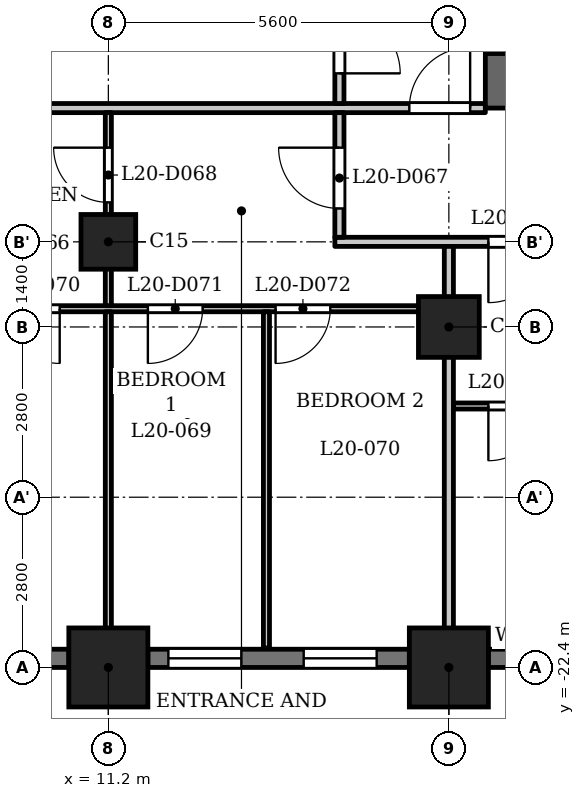
"""IFC4 building model, lengths in metres.
Left out: names, types, materials, properties, quantities, classifications, styles, units other than length and angle.
Written with IfcOpenShell. Run it as: python <this file> out.ifc"""

import sys

from ifc_helpers import new_model, si_unit, direction, frame, frame_2d, origin, origin_2d, place, context, subcontext, project, spatial, rectangle, extrude, element, fill, save


model = new_model("IFC4")
c1 = context("Model", 3, precision=1e-05, world=origin(), true_north=direction((0.0, 1.0)))
c2 = subcontext(c1, "Body", "Model", "MODEL_VIEW")
j1 = project(units=[si_unit("LENGTHUNIT", "METRE"), si_unit("PLANEANGLEUNIT", "RADIAN")], contexts=[c1])
p1 = place(None, origin())
s1 = spatial("IfcSite", under=j1, at=p1, CompositionType="ELEMENT")
p2 = place(p1, origin())
s2 = spatial("IfcBuilding", under=s1, at=p2, CompositionType="ELEMENT")
p3 = place(p2, frame((0.0, 0.0, 83.3)))
s3 = spatial("IfcBuildingStorey", under=s2, at=p3, CompositionType="ELEMENT", Elevation=83.3)
for number, where, z_axis, x_axis in (
    (1, (11.2, -22.4, 0.0), (0.0, 0.0, 1.0), (1.0, 0.0, 0.0)),
    (2, (16.8, -22.4, 0.0), (0.0, 0.0, 1.0), (1.0, 0.0, 0.0)),
):
    element("IfcColumn", number, at=place(p3, frame(where, z_axis=z_axis, x_axis=x_axis)), inside=s3, PredefinedType="COLUMN", context=c2, shape_type="SweptSolid", body=[
        extrude(rectangle(XDim=1.3, YDim=1.3, at=origin_2d()), origin(), (0.0, 0.0, 1.0), 3.5),
    ])
p4 = place(p3, frame((16.8, -16.8, 0.0), z_axis=(0.0, 0.0, 1.0), x_axis=(1.0, 0.0, 0.0)))
e3 = element("IfcColumn", 3, at=p4, inside=s3, PredefinedType="COLUMN", context=c2, shape_type="SweptSolid", body=[
    extrude(rectangle(XDim=1.0, YDim=1.0, at=origin_2d()), origin(), (0.0, 0.0, 1.0), 3.5),
])
p5 = place(p3, frame((11.2, -15.4, 0.0), z_axis=(0.0, 0.0, 1.0), x_axis=(1.0, 0.0, 0.0)))
e4 = element("IfcColumn", 4, at=p5, inside=s3, PredefinedType="COLUMN", context=c2, shape_type="SweptSolid", body=[
    extrude(rectangle(XDim=0.9, YDim=0.9, at=origin_2d()), origin(), (0.0, 0.0, 1.0), 3.5),
])
p6 = place(p3, frame((6.25, -22.25, 0.0), z_axis=(0.0, 0.0, 1.0), x_axis=(1.0, 0.0, 0.0)))
e5 = element("IfcWall", 5, at=p6, inside=s3, PredefinedType="SOLIDWALL", context=c2, shape_type="SweptSolid", body=[
    extrude(rectangle(XDim=4.3, YDim=0.3, at=frame_2d((2.15, 0.0))), origin(), (0.0, 0.0, 1.0), 2.4),
])
p7 = place(p6, frame((0.35, 0.0, 1.2)))
e6 = element("IfcOpeningElement", 6, at=p7, cuts=e5, PredefinedType="OPENING", context=c2, shape_type="SweptSolid", body=[
    extrude(rectangle(XDim=3.6, YDim=0.95, at=frame_2d((1.8, 0.475))), frame((0.0, 0.16, 0.0), z_axis=(0.0, -1.0, 0.0), x_axis=(1.0, 0.0, 0.0)), (0.0, 0.0, 1.0), 0.32),
])
p8 = place(p3, frame((11.85, -22.25, 0.0), z_axis=(0.0, 0.0, 1.0), x_axis=(1.0, 0.0, 0.0)))
e7 = element("IfcWall", 7, at=p8, inside=s3, PredefinedType="SOLIDWALL", context=c2, shape_type="SweptSolid", body=[
    extrude(rectangle(XDim=4.3, YDim=0.3, at=frame_2d((2.15, 0.0))), origin(), (0.0, 0.0, 1.0), 2.4),
])
p9 = place(p8, frame((0.337, 0.0, 0.6)))
e8 = element("IfcOpeningElement", 8, at=p9, cuts=e7, PredefinedType="OPENING", context=c2, shape_type="SweptSolid", body=[
    extrude(rectangle(XDim=1.2, YDim=1.55, at=frame_2d((0.6, 0.775))), frame((0.0, 0.16, 0.0), z_axis=(0.0, -1.0, 0.0), x_axis=(1.0, 0.0, 0.0)), (0.0, 0.0, 1.0), 0.32),
])
p10 = place(p8, frame((2.562, 0.0, 0.6)))
e9 = element("IfcOpeningElement", 9, at=p10, cuts=e7, PredefinedType="OPENING", context=c2, shape_type="SweptSolid", body=[
    extrude(rectangle(XDim=1.2, YDim=1.55, at=frame_2d((0.6, 0.775))), frame((0.0, 0.16, 0.0), z_axis=(0.0, -1.0, 0.0), x_axis=(1.0, 0.0, 0.0)), (0.0, 0.0, 1.0), 0.32),
])
p11 = place(p3, frame((17.45, -22.25, 0.0), z_axis=(0.0, 0.0, 1.0), x_axis=(1.0, 0.0, 0.0)))
e10 = element("IfcWall", 10, at=p11, inside=s3, PredefinedType="SOLIDWALL", context=c2, shape_type="SweptSolid", body=[
    extrude(rectangle(XDim=2.55, YDim=0.3, at=frame_2d((1.275, 0.0))), origin(), (0.0, 0.0, 1.0), 2.4),
])
p12 = place(p11, frame((0.375, 0.0, 0.9)))
e11 = element("IfcOpeningElement", 11, at=p12, cuts=e10, PredefinedType="OPENING", context=c2, shape_type="SweptSolid", body=[
    extrude(rectangle(XDim=1.8, YDim=1.25, at=frame_2d((0.9, 0.625))), frame((0.0, 0.16, 0.0), z_axis=(0.0, -1.0, 0.0), x_axis=(1.0, 0.0, 0.0)), (0.0, 0.0, 1.0), 0.32),
])
p13 = place(p3, frame((17.4, -12.75, 0.0), z_axis=(0.0, 0.0, 1.0), x_axis=(1.0, 0.0, 0.0)))
e12 = element("IfcWall", 12, at=p13, inside=s3, PredefinedType="SHEAR", context=c2, shape_type="SweptSolid", body=[
    extrude(rectangle(XDim=10.4, YDim=0.9, at=frame_2d((5.2, 0.0))), origin(), (0.0, 0.0, 1.0), 3.2),
])
p14 = place(p3, frame((17.6, -12.3, 0.0), z_axis=(0.0, 0.0, 1.0), x_axis=(0.0, 1.0, 0.0)))
e13 = element("IfcWall", 13, at=p14, inside=s3, PredefinedType="SHEAR", context=c2, shape_type="SweptSolid", body=[
    extrude(rectangle(XDim=24.6, YDim=0.4, at=frame_2d((12.3, 0.0))), origin(), (0.0, 0.0, 1.0), 3.2),
])
p15 = place(p14, frame((6.0, 0.0, 0.0)))
e14 = element("IfcOpeningElement", 14, at=p15, cuts=e13, PredefinedType="OPENING", context=c2, shape_type="SweptSolid", body=[
    extrude(rectangle(XDim=1.1, YDim=2.1, at=frame_2d((0.55, 1.05))), frame((0.0, 0.21, 0.0), z_axis=(0.0, -1.0, 0.0), x_axis=(1.0, 0.0, 0.0)), (0.0, 0.0, 1.0), 0.42),
])
p16 = place(p14, frame((8.4, 0.0, 0.0)))
e15 = element("IfcOpeningElement", 15, at=p16, cuts=e13, PredefinedType="OPENING", context=c2, shape_type="SweptSolid", body=[
    extrude(rectangle(XDim=1.1, YDim=2.1, at=frame_2d((0.55, 1.05))), frame((0.0, 0.21, 0.0), z_axis=(0.0, -1.0, 0.0), x_axis=(1.0, 0.0, 0.0)), (0.0, 0.0, 1.0), 0.42),
])
p17 = place(p14, frame((10.8, 0.0, 0.0)))
e16 = element("IfcOpeningElement", 16, at=p17, cuts=e13, PredefinedType="OPENING", context=c2, shape_type="SweptSolid", body=[
    extrude(rectangle(XDim=1.1, YDim=2.1, at=frame_2d((0.55, 1.05))), frame((0.0, 0.21, 0.0), z_axis=(0.0, -1.0, 0.0), x_axis=(1.0, 0.0, 0.0)), (0.0, 0.0, 1.0), 0.42),
])
p18 = place(p14, frame((16.75, 0.0, 0.0)))
e17 = element("IfcOpeningElement", 17, at=p18, cuts=e13, PredefinedType="OPENING", context=c2, shape_type="SweptSolid", body=[
    extrude(rectangle(XDim=0.9, YDim=2.1, at=frame_2d((0.45, 1.05))), frame((0.0, 0.21, 0.0), z_axis=(0.0, -1.0, 0.0), x_axis=(1.0, 0.0, 0.0)), (0.0, 0.0, 1.0), 0.42),
])
p19 = place(p14, frame((22.8, 0.0, 0.0)))
e18 = element("IfcOpeningElement", 18, at=p19, cuts=e13, PredefinedType="OPENING", context=c2, shape_type="SweptSolid", body=[
    extrude(rectangle(XDim=1.1, YDim=2.1, at=frame_2d((0.55, 1.05))), frame((0.0, 0.21, 0.0), z_axis=(0.0, -1.0, 0.0), x_axis=(1.0, 0.0, 0.0)), (0.0, 0.0, 1.0), 0.42),
])
p20 = place(p14, frame((0.7, 0.0, 0.0)))
e19 = element("IfcOpeningElement", 19, at=p20, cuts=e13, PredefinedType="OPENING", context=c2, shape_type="SweptSolid", body=[
    extrude(rectangle(XDim=1.1, YDim=2.1, at=frame_2d((0.55, 1.05))), frame((0.0, 0.21, 0.0), z_axis=(0.0, -1.0, 0.0), x_axis=(1.0, 0.0, 0.0)), (0.0, 0.0, 1.0), 0.42),
])
p21 = place(p14, frame((12.775, 0.0, 0.0)))
e20 = element("IfcOpeningElement", 20, at=p21, cuts=e13, PredefinedType="OPENING", context=c2, shape_type="SweptSolid", body=[
    extrude(rectangle(XDim=1.8, YDim=2.1, at=frame_2d((0.9, 1.05))), frame((0.0, 0.21, 0.0), z_axis=(0.0, -1.0, 0.0), x_axis=(1.0, 0.0, 0.0)), (0.0, 0.0, 1.0), 0.42),
])
p22 = place(p3, frame((16.875, -18.1, 0.0), z_axis=(0.0, 0.0, 1.0), x_axis=(1.0, 0.0, 0.0)))
e21 = element("IfcWall", 21, at=p22, inside=s3, PredefinedType="PARTITIONING", context=c2, shape_type="SweptSolid", body=[
    extrude(rectangle(XDim=9.565, YDim=0.1, at=frame_2d((4.782, 0.0))), origin(), (0.0, 0.0, 1.0), 3.2),
])
p23 = place(p22, frame((6.139, 0.0, 0.0)))
e22 = element("IfcOpeningElement", 22, at=p23, cuts=e21, PredefinedType="OPENING", context=c2, shape_type="SweptSolid", body=[
    extrude(rectangle(XDim=0.8, YDim=2.1, at=frame_2d((0.4, 1.05))), frame((0.0, 0.06, 0.0), z_axis=(0.0, -1.0, 0.0), x_axis=(1.0, 0.0, 0.0)), (0.0, 0.0, 1.0), 0.12),
])
p24 = place(p22, frame((0.575, 0.0, 0.0)))
e23 = element("IfcOpeningElement", 23, at=p24, cuts=e21, PredefinedType="OPENING", context=c2, shape_type="SweptSolid", body=[
    extrude(rectangle(XDim=0.9, YDim=2.1, at=frame_2d((0.45, 1.05))), frame((0.0, 0.06, 0.0), z_axis=(0.0, -1.0, 0.0), x_axis=(1.0, 0.0, 0.0)), (0.0, 0.0, 1.0), 0.12),
])
p25 = place(p3, frame((-16.725, -16.5, 0.0), z_axis=(0.0, 0.0, 1.0), x_axis=(1.0, 0.0, 0.0)))
e24 = element("IfcWall", 24, at=p25, inside=s3, PredefinedType="PARTITIONING", context=c2, shape_type="SweptSolid", body=[
    extrude(rectangle(XDim=33.45, YDim=0.1, at=frame_2d((16.725, 0.0))), origin(), (0.0, 0.0, 1.0), 3.2),
])
p26 = place(p25, frame((3.825, 0.0, 0.0)))
e25 = element("IfcOpeningElement", 25, at=p26, cuts=e24, PredefinedType="OPENING", context=c2, shape_type="SweptSolid", body=[
    extrude(rectangle(XDim=0.8, YDim=2.1, at=frame_2d((0.4, 1.05))), frame((0.0, 0.06, 0.0), z_axis=(0.0, -1.0, 0.0), x_axis=(1.0, 0.0, 0.0)), (0.0, 0.0, 1.0), 0.12),
])
p27 = place(p25, frame((1.825, 0.0, 0.0)))
e26 = element("IfcOpeningElement", 26, at=p27, cuts=e24, PredefinedType="OPENING", context=c2, shape_type="SweptSolid", body=[
    extrude(rectangle(XDim=0.9, YDim=2.1, at=frame_2d((0.45, 1.05))), frame((0.0, 0.06, 0.0), z_axis=(0.0, -1.0, 0.0), x_axis=(1.0, 0.0, 0.0)), (0.0, 0.0, 1.0), 0.12),
])
p28 = place(p25, frame((9.675, 0.0, 0.0)))
e27 = element("IfcOpeningElement", 27, at=p28, cuts=e24, PredefinedType="OPENING", context=c2, shape_type="SweptSolid", body=[
    extrude(rectangle(XDim=0.8, YDim=2.1, at=frame_2d((0.4, 1.05))), frame((0.0, 0.06, 0.0), z_axis=(0.0, -1.0, 0.0), x_axis=(1.0, 0.0, 0.0)), (0.0, 0.0, 1.0), 0.12),
])
p29 = place(p25, frame((6.425, 0.0, 0.0)))
e28 = element("IfcOpeningElement", 28, at=p29, cuts=e24, PredefinedType="OPENING", context=c2, shape_type="SweptSolid", body=[
    extrude(rectangle(XDim=0.9, YDim=2.1, at=frame_2d((0.45, 1.05))), frame((0.0, 0.06, 0.0), z_axis=(0.0, -1.0, 0.0), x_axis=(1.0, 0.0, 0.0)), (0.0, 0.0, 1.0), 0.12),
])
p30 = place(p25, frame((15.275, 0.0, 0.0)))
e29 = element("IfcOpeningElement", 29, at=p30, cuts=e24, PredefinedType="OPENING", context=c2, shape_type="SweptSolid", body=[
    extrude(rectangle(XDim=0.8, YDim=2.1, at=frame_2d((0.4, 1.05))), frame((0.0, 0.06, 0.0), z_axis=(0.0, -1.0, 0.0), x_axis=(1.0, 0.0, 0.0)), (0.0, 0.0, 1.0), 0.12),
])
p31 = place(p25, frame((12.025, 0.0, 0.0)))
e30 = element("IfcOpeningElement", 30, at=p31, cuts=e24, PredefinedType="OPENING", context=c2, shape_type="SweptSolid", body=[
    extrude(rectangle(XDim=0.9, YDim=2.1, at=frame_2d((0.45, 1.05))), frame((0.0, 0.06, 0.0), z_axis=(0.0, -1.0, 0.0), x_axis=(1.0, 0.0, 0.0)), (0.0, 0.0, 1.0), 0.12),
])
p32 = place(p25, frame((20.875, 0.0, 0.0)))
e31 = element("IfcOpeningElement", 31, at=p32, cuts=e24, PredefinedType="OPENING", context=c2, shape_type="SweptSolid", body=[
    extrude(rectangle(XDim=0.8, YDim=2.1, at=frame_2d((0.4, 1.05))), frame((0.0, 0.06, 0.0), z_axis=(0.0, -1.0, 0.0), x_axis=(1.0, 0.0, 0.0)), (0.0, 0.0, 1.0), 0.12),
])
p33 = place(p25, frame((18.625, 0.0, 0.0)))
e32 = element("IfcOpeningElement", 32, at=p33, cuts=e24, PredefinedType="OPENING", context=c2, shape_type="SweptSolid", body=[
    extrude(rectangle(XDim=0.9, YDim=2.1, at=frame_2d((0.45, 1.05))), frame((0.0, 0.06, 0.0), z_axis=(0.0, -1.0, 0.0), x_axis=(1.0, 0.0, 0.0)), (0.0, 0.0, 1.0), 0.12),
])
p34 = place(p25, frame((23.875, 0.0, 0.0)))
e33 = element("IfcOpeningElement", 33, at=p34, cuts=e24, PredefinedType="OPENING", context=c2, shape_type="SweptSolid", body=[
    extrude(rectangle(XDim=0.8, YDim=2.1, at=frame_2d((0.4, 1.05))), frame((0.0, 0.06, 0.0), z_axis=(0.0, -1.0, 0.0), x_axis=(1.0, 0.0, 0.0)), (0.0, 0.0, 1.0), 0.12),
])
p35 = place(p25, frame((26.225, 0.0, 0.0)))
e34 = element("IfcOpeningElement", 34, at=p35, cuts=e24, PredefinedType="OPENING", context=c2, shape_type="SweptSolid", body=[
    extrude(rectangle(XDim=0.9, YDim=2.1, at=frame_2d((0.45, 1.05))), frame((0.0, 0.06, 0.0), z_axis=(0.0, -1.0, 0.0), x_axis=(1.0, 0.0, 0.0)), (0.0, 0.0, 1.0), 0.12),
])
p36 = place(p25, frame((28.575, 0.0, 0.0)))
e35 = element("IfcOpeningElement", 35, at=p36, cuts=e24, PredefinedType="OPENING", context=c2, shape_type="SweptSolid", body=[
    extrude(rectangle(XDim=0.9, YDim=2.1, at=frame_2d((0.45, 1.05))), frame((0.0, 0.06, 0.0), z_axis=(0.0, -1.0, 0.0), x_axis=(1.0, 0.0, 0.0)), (0.0, 0.0, 1.0), 0.12),
])
p37 = place(p25, frame((30.675, 0.0, 0.0)))
e36 = element("IfcOpeningElement", 36, at=p37, cuts=e24, PredefinedType="OPENING", context=c2, shape_type="SweptSolid", body=[
    extrude(rectangle(XDim=0.9, YDim=2.1, at=frame_2d((0.45, 1.05))), frame((0.0, 0.06, 0.0), z_axis=(0.0, -1.0, 0.0), x_axis=(1.0, 0.0, 0.0)), (0.0, 0.0, 1.0), 0.12),
])
p38 = place(p3, frame((14.925, -15.4, 0.0), z_axis=(0.0, 0.0, 1.0), x_axis=(1.0, 0.0, 0.0)))
e37 = element("IfcWall", 37, at=p38, inside=s3, PredefinedType="PARTITIONING", context=c2, shape_type="SweptSolid", body=[
    extrude(rectangle(XDim=12.559, YDim=0.15, at=frame_2d((6.279, 0.0))), origin(), (0.0, 0.0, 1.0), 3.2),
])
p39 = place(p38, frame((2.525, 0.0, 0.0)))
e38 = element("IfcOpeningElement", 38, at=p39, cuts=e37, PredefinedType="OPENING", context=c2, shape_type="SweptSolid", body=[
    extrude(rectangle(XDim=1.0, YDim=2.1, at=frame_2d((0.5, 1.05))), frame((0.0, 0.085, 0.0), z_axis=(0.0, -1.0, 0.0), x_axis=(1.0, 0.0, 0.0)), (0.0, 0.0, 1.0), 0.17),
])
p40 = place(p3, frame((-17.4, -13.2, 0.0), z_axis=(0.0, 0.0, 1.0), x_axis=(1.0, 0.0, 0.0)))
e39 = element("IfcWall", 39, at=p40, inside=s3, PredefinedType="PARTITIONING", context=c2, shape_type="SweptSolid", body=[
    extrude(rectangle(XDim=34.8, YDim=0.15, at=frame_2d((17.4, 0.0))), origin(), (0.0, 0.0, 1.0), 3.2),
])
p41 = place(p40, frame((0.15, 0.0, 0.0)))
e40 = element("IfcOpeningElement", 40, at=p41, cuts=e39, PredefinedType="OPENING", context=c2, shape_type="SweptSolid", body=[
    extrude(rectangle(XDim=1.0, YDim=2.1, at=frame_2d((0.5, 1.05))), frame((0.0, 0.085, 0.0), z_axis=(0.0, -1.0, 0.0), x_axis=(1.0, 0.0, 0.0)), (0.0, 0.0, 1.0), 0.17),
])
p42 = place(p40, frame((33.55, 0.0, 0.0)))
e41 = element("IfcOpeningElement", 41, at=p42, cuts=e39, PredefinedType="OPENING", context=c2, shape_type="SweptSolid", body=[
    extrude(rectangle(XDim=1.0, YDim=2.1, at=frame_2d((0.5, 1.05))), frame((0.0, 0.085, 0.0), z_axis=(0.0, -1.0, 0.0), x_axis=(1.0, 0.0, 0.0)), (0.0, 0.0, 1.0), 0.17),
])
p43 = place(p40, frame((7.35, 0.0, 0.0)))
e42 = element("IfcOpeningElement", 42, at=p43, cuts=e39, PredefinedType="OPENING", context=c2, shape_type="SweptSolid", body=[
    extrude(rectangle(XDim=1.0, YDim=2.1, at=frame_2d((0.5, 1.05))), frame((0.0, 0.085, 0.0), z_axis=(0.0, -1.0, 0.0), x_axis=(1.0, 0.0, 0.0)), (0.0, 0.0, 1.0), 0.17),
])
p44 = place(p40, frame((13.7, 0.0, 0.0)))
e43 = element("IfcOpeningElement", 43, at=p44, cuts=e39, PredefinedType="OPENING", context=c2, shape_type="SweptSolid", body=[
    extrude(rectangle(XDim=1.0, YDim=2.1, at=frame_2d((0.5, 1.05))), frame((0.0, 0.085, 0.0), z_axis=(0.0, -1.0, 0.0), x_axis=(1.0, 0.0, 0.0)), (0.0, 0.0, 1.0), 0.17),
])
p45 = place(p40, frame((19.3, 0.0, 0.0)))
e44 = element("IfcOpeningElement", 44, at=p45, cuts=e39, PredefinedType="OPENING", context=c2, shape_type="SweptSolid", body=[
    extrude(rectangle(XDim=1.0, YDim=2.1, at=frame_2d((0.5, 1.05))), frame((0.0, 0.085, 0.0), z_axis=(0.0, -1.0, 0.0), x_axis=(1.0, 0.0, 0.0)), (0.0, 0.0, 1.0), 0.17),
])
p46 = place(p3, frame((11.2, -23.03, 0.0), z_axis=(0.0, 0.0, 1.0), x_axis=(0.0, 1.0, 0.0)))
e45 = element("IfcWall", 45, at=p46, inside=s3, PredefinedType="PARTITIONING", context=c2, shape_type="SweptSolid", body=[
    extrude(rectangle(XDim=6.48, YDim=0.1, at=frame_2d((3.24, 0.0))), origin(), (0.0, 0.0, 1.0), 3.2),
])
p47 = place(p3, frame((11.2, -16.45, 0.0), z_axis=(0.0, 0.0, 1.0), x_axis=(0.0, 1.0, 0.0)))
e46 = element("IfcWall", 46, at=p47, inside=s3, PredefinedType="PARTITIONING", context=c2, shape_type="SweptSolid", body=[
    extrude(rectangle(XDim=3.175, YDim=0.1, at=frame_2d((1.587, 0.0))), origin(), (0.0, 0.0, 1.0), 3.2),
])
p48 = place(p47, frame((1.699, 0.0, 0.0)))
e47 = element("IfcOpeningElement", 47, at=p48, cuts=e46, PredefinedType="OPENING", context=c2, shape_type="SweptSolid", body=[
    extrude(rectangle(XDim=0.9, YDim=2.1, at=frame_2d((0.45, 1.05))), frame((0.0, 0.06, 0.0), z_axis=(0.0, -1.0, 0.0), x_axis=(1.0, 0.0, 0.0)), (0.0, 0.0, 1.0), 0.12),
])
p49 = place(p3, frame((13.8, -22.08, 0.0), z_axis=(0.0, 0.0, 1.0), x_axis=(0.0, 1.0, 0.0)))
e48 = element("IfcWall", 48, at=p49, inside=s3, PredefinedType="PARTITIONING", context=c2, shape_type="SweptSolid", body=[
    extrude(rectangle(XDim=5.53, YDim=0.1, at=frame_2d((2.765, 0.0))), origin(), (0.0, 0.0, 1.0), 3.2),
])
p50 = place(p3, frame((15.0, -15.325, 0.0), z_axis=(0.0, 0.0, 1.0), x_axis=(0.0, 1.0, 0.0)))
e49 = element("IfcWall", 49, at=p50, inside=s3, PredefinedType="PARTITIONING", context=c2, shape_type="SweptSolid", body=[
    extrude(rectangle(XDim=2.05, YDim=0.15, at=frame_2d((1.025, 0.0))), origin(), (0.0, 0.0, 1.0), 3.2),
])
p51 = place(p50, frame((0.474, 0.0, 0.0)))
e50 = element("IfcOpeningElement", 50, at=p51, cuts=e49, PredefinedType="OPENING", context=c2, shape_type="SweptSolid", body=[
    extrude(rectangle(XDim=1.0, YDim=2.1, at=frame_2d((0.5, 1.05))), frame((0.0, 0.085, 0.0), z_axis=(0.0, -1.0, 0.0), x_axis=(1.0, 0.0, 0.0)), (0.0, 0.0, 1.0), 0.17),
])
p52 = place(p3, frame((15.0, -13.125, 0.0), z_axis=(0.0, 0.0, 1.0), x_axis=(0.0, 1.0, 0.0)))
e51 = element("IfcWall", 51, at=p52, inside=s3, PredefinedType="PARTITIONING", context=c2, shape_type="SweptSolid", body=[
    extrude(rectangle(XDim=6.356, YDim=0.15, at=frame_2d((3.178, 0.0))), origin(), (0.0, 0.0, 1.0), 3.2),
])
p53 = place(p52, frame((0.496, 0.0, 0.0)))
e52 = element("IfcOpeningElement", 52, at=p53, cuts=e51, PredefinedType="OPENING", context=c2, shape_type="SweptSolid", body=[
    extrude(rectangle(XDim=1.0, YDim=2.1, at=frame_2d((0.5, 1.05))), frame((0.0, 0.085, 0.0), z_axis=(0.0, -1.0, 0.0), x_axis=(1.0, 0.0, 0.0)), (0.0, 0.0, 1.0), 0.17),
])
p54 = place(p3, frame((16.8, -23.03, 0.0), z_axis=(0.0, 0.0, 1.0), x_axis=(0.0, 1.0, 0.0)))
e53 = element("IfcWall", 53, at=p54, inside=s3, PredefinedType="PARTITIONING", context=c2, shape_type="SweptSolid", body=[
    extrude(rectangle(XDim=7.555, YDim=0.15, at=frame_2d((3.777, 0.0))), origin(), (0.0, 0.0, 1.0), 3.2),
])
p55 = place(p53, origin())
e54 = element("IfcDoor", 54, at=p55, inside=s3, OperationType="SINGLE_SWING_LEFT", PredefinedType="DOOR", context=c2, shape_type="SweptSolid", body=[
    extrude(rectangle(XDim=1.0, YDim=2.1, at=frame_2d((0.5, 1.05))), frame((0.0, 0.025, 0.0), z_axis=(0.0, -1.0, 0.0), x_axis=(1.0, 0.0, 0.0)), (0.0, 0.0, 1.0), 0.05),
])
fill(e52, e54)
p56 = place(p42, origin())
e55 = element("IfcDoor", 55, at=p56, inside=s3, OperationType="SINGLE_SWING_LEFT", PredefinedType="DOOR", context=c2, shape_type="SweptSolid", body=[
    extrude(rectangle(XDim=1.0, YDim=2.1, at=frame_2d((0.5, 1.05))), frame((0.0, 0.025, 0.0), z_axis=(0.0, -1.0, 0.0), x_axis=(1.0, 0.0, 0.0)), (0.0, 0.0, 1.0), 0.05),
])
fill(e41, e55)
p57 = place(p51, origin())
e56 = element("IfcDoor", 56, at=p57, inside=s3, OperationType="SINGLE_SWING_LEFT", PredefinedType="DOOR", context=c2, shape_type="SweptSolid", body=[
    extrude(rectangle(XDim=1.0, YDim=2.1, at=frame_2d((0.5, 1.05))), frame((0.0, 0.025, 0.0), z_axis=(0.0, -1.0, 0.0), x_axis=(1.0, 0.0, 0.0)), (0.0, 0.0, 1.0), 0.05),
])
fill(e50, e56)
p58 = place(p48, origin())
e57 = element("IfcDoor", 57, at=p58, inside=s3, OperationType="SINGLE_SWING_LEFT", PredefinedType="DOOR", context=c2, shape_type="SweptSolid", body=[
    extrude(rectangle(XDim=0.9, YDim=2.1, at=frame_2d((0.45, 1.05))), frame((0.0, 0.025, 0.0), z_axis=(0.0, -1.0, 0.0), x_axis=(1.0, 0.0, 0.0)), (0.0, 0.0, 1.0), 0.05),
])
fill(e47, e57)
p59 = place(p35, origin())
e58 = element("IfcDoor", 58, at=p59, inside=s3, OperationType="SINGLE_SWING_RIGHT", PredefinedType="DOOR", context=c2, shape_type="SweptSolid", body=[
    extrude(rectangle(XDim=0.9, YDim=2.1, at=frame_2d((0.45, 1.05))), frame((0.0, 0.025, 0.0), z_axis=(0.0, -1.0, 0.0), x_axis=(1.0, 0.0, 0.0)), (0.0, 0.0, 1.0), 0.05),
])
fill(e34, e58)
p60 = place(p36, origin())
e59 = element("IfcDoor", 59, at=p60, inside=s3, OperationType="SINGLE_SWING_LEFT", PredefinedType="DOOR", context=c2, shape_type="SweptSolid", body=[
    extrude(rectangle(XDim=0.9, YDim=2.1, at=frame_2d((0.45, 1.05))), frame((0.0, 0.025, 0.0), z_axis=(0.0, -1.0, 0.0), x_axis=(1.0, 0.0, 0.0)), (0.0, 0.0, 1.0), 0.05),
])
fill(e35, e59)
p61 = place(p37, origin())
e60 = element("IfcDoor", 60, at=p61, inside=s3, OperationType="SINGLE_SWING_LEFT", PredefinedType="DOOR", context=c2, shape_type="SweptSolid", body=[
    extrude(rectangle(XDim=0.9, YDim=2.1, at=frame_2d((0.45, 1.05))), frame((0.0, 0.025, 0.0), z_axis=(0.0, -1.0, 0.0), x_axis=(1.0, 0.0, 0.0)), (0.0, 0.0, 1.0), 0.05),
])
fill(e36, e60)
p62 = place(p39, origin())
e61 = element("IfcDoor", 61, at=p62, inside=s3, OperationType="SINGLE_SWING_LEFT", PredefinedType="DOOR", context=c2, shape_type="SweptSolid", body=[
    extrude(rectangle(XDim=1.0, YDim=2.1, at=frame_2d((0.5, 1.05))), frame((0.0, 0.025, 0.0), z_axis=(0.0, -1.0, 0.0), x_axis=(1.0, 0.0, 0.0)), (0.0, 0.0, 1.0), 0.05),
])
fill(e38, e61)
p63 = place(p24, origin())
e62 = element("IfcDoor", 62, at=p63, inside=s3, OperationType="SINGLE_SWING_LEFT", PredefinedType="DOOR", context=c2, shape_type="SweptSolid", body=[
    extrude(rectangle(XDim=0.9, YDim=2.1, at=frame_2d((0.45, 1.05))), frame((0.0, 0.025, 0.0), z_axis=(0.0, -1.0, 0.0), x_axis=(1.0, 0.0, 0.0)), (0.0, 0.0, 1.0), 0.05),
])
fill(e23, e62)
p64 = place(p9, origin())
e63 = element("IfcWindow", 63, at=p64, inside=s3, PartitioningType="SINGLE_PANEL", PredefinedType="WINDOW", context=c2, shape_type="SweptSolid", body=[
    extrude(rectangle(XDim=1.2, YDim=1.55, at=frame_2d((0.6, 0.775))), frame((0.0, 0.03, 0.0), z_axis=(0.0, -1.0, 0.0), x_axis=(1.0, 0.0, 0.0)), (0.0, 0.0, 1.0), 0.06),
])
fill(e8, e63)
p65 = place(p10, origin())
e64 = element("IfcWindow", 64, at=p65, inside=s3, PartitioningType="SINGLE_PANEL", PredefinedType="WINDOW", context=c2, shape_type="SweptSolid", body=[
    extrude(rectangle(XDim=1.2, YDim=1.55, at=frame_2d((0.6, 0.775))), frame((0.0, 0.03, 0.0), z_axis=(0.0, -1.0, 0.0), x_axis=(1.0, 0.0, 0.0)), (0.0, 0.0, 1.0), 0.06),
])
fill(e9, e64)
save(model, sys.argv[1])
